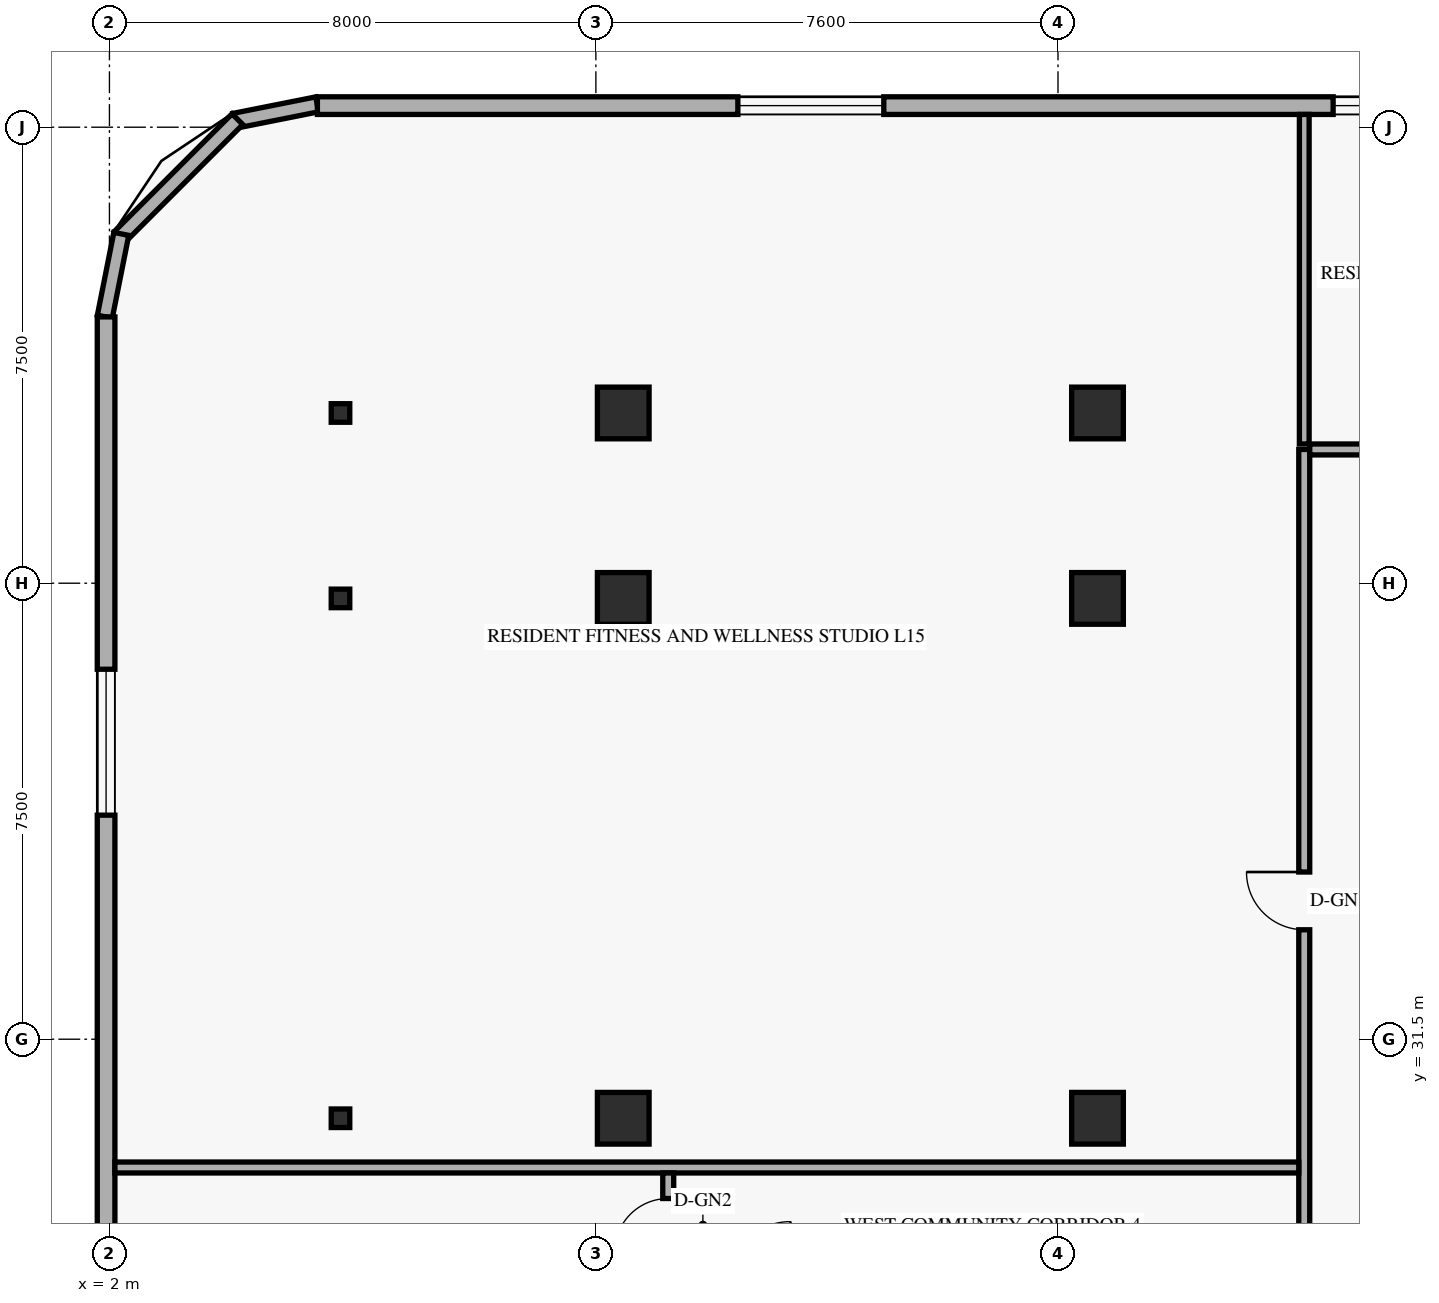
"""IFC4 building model, lengths in metres.
Left out: names, types, materials, properties, quantities, classifications, styles, units other than length and angle.
Written with IfcOpenShell. Run it as: python <this file> out.ifc"""

import sys

from ifc_helpers import new_model, si_unit, direction, frame, frame_2d, origin, origin_2d, place, context, subcontext, project, spatial, rectangle, hollow_rectangle, extrude, element, fill, save


model = new_model("IFC4")
c1 = context("Model", 3, precision=1e-05, world=origin(), true_north=direction((0.0, 1.0)))
c2 = subcontext(c1, "Body", "Model", "MODEL_VIEW")
j1 = project(units=[si_unit("LENGTHUNIT", "METRE"), si_unit("PLANEANGLEUNIT", "RADIAN")], contexts=[c1])
p1 = place(None, origin())
s1 = spatial("IfcSite", under=j1, at=p1, CompositionType="ELEMENT")
p2 = place(p1, origin())
s2 = spatial("IfcBuilding", under=s1, at=p2, CompositionType="ELEMENT")
p3 = place(p2, frame((0.0, 0.0, 60.0)))
s3 = spatial("IfcBuildingStorey", under=s2, at=p3, CompositionType="ELEMENT", Elevation=60.0)
for number, where, z_axis, x_axis in (
    (1, (5.8, 30.2, 0.0), (0.0, 0.0, 1.0), (1.0, 0.0, 0.0)),
    (2, (5.8, 38.75, 0.0), (0.0, 0.0, 1.0), (1.0, 0.0, 0.0)),
    (3, (5.8, 41.8, 0.0), (0.0, 0.0, 1.0), (1.0, 0.0, 0.0)),
):
    element("IfcColumn", number, at=place(p3, frame(where, z_axis=z_axis, x_axis=x_axis)), inside=s3, PredefinedType="COLUMN", context=c2, shape_type="SweptSolid", body=[
        extrude(hollow_rectangle(XDim=0.305, YDim=0.305, WallThickness=0.013, at=origin_2d()), origin(), (0.0, 0.0, 1.0), 4.2),
    ])
for number, where, z_axis, x_axis in (
    (4, (10.45, 30.2, 0.0), (0.0, 0.0, 1.0), (1.0, 0.0, 0.0)),
    (5, (10.45, 38.75, 0.0), (0.0, 0.0, 1.0), (1.0, 0.0, 0.0)),
    (6, (10.45, 41.8, 0.0), (0.0, 0.0, 1.0), (1.0, 0.0, 0.0)),
    (7, (18.25, 30.2, 0.0), (0.0, 0.0, 1.0), (1.0, 0.0, 0.0)),
    (8, (18.25, 38.75, 0.0), (0.0, 0.0, 1.0), (1.0, 0.0, 0.0)),
    (9, (18.25, 41.8, 0.0), (0.0, 0.0, 1.0), (1.0, 0.0, 0.0)),
):
    element("IfcColumn", number, at=place(p3, frame(where, z_axis=z_axis, x_axis=x_axis)), inside=s3, PredefinedType="COLUMN", context=c2, shape_type="SweptSolid", body=[
        extrude(rectangle(XDim=0.85, YDim=0.85, at=origin_2d()), origin(), (0.0, 0.0, 1.0), 4.2),
    ])
p4 = place(p3, frame((5.417, 46.876, 0.0), z_axis=(0.0, 0.0, 1.0), x_axis=(-0.980809899341, -0.19496651342, 0.0)))
e10 = element("IfcWall", 10, at=p4, inside=s3, PredefinedType="SOLIDWALL", context=c2, shape_type="SweptSolid", body=[
    extrude(rectangle(XDim=1.389, YDim=0.25, at=frame_2d((0.694, 0.0))), origin(), (0.0, 0.0, 1.0), 3.96),
])
p5 = place(p3, frame((4.105, 46.632, 0.0), z_axis=(0.0, 0.0, 1.0), x_axis=(-0.707106781187, -0.707106781187, 0.0)))
e11 = element("IfcWall", 11, at=p5, inside=s3, PredefinedType="SOLIDWALL", context=c2, shape_type="SweptSolid", body=[
    extrude(rectangle(XDim=2.739, YDim=0.25, at=frame_2d((1.37, 0.0))), origin(), (0.0, 0.0, 1.0), 3.96),
])
p6 = place(p3, frame((2.195, 44.746, 0.0), z_axis=(0.0, 0.0, 1.0), x_axis=(-0.19496651342, -0.980809899341, 0.0)))
e12 = element("IfcWall", 12, at=p6, inside=s3, PredefinedType="SOLIDWALL", context=c2, shape_type="SweptSolid", body=[
    extrude(rectangle(XDim=1.389, YDim=0.25, at=frame_2d((0.694, 0.0))), origin(), (0.0, 0.0, 1.0), 3.96),
])
p7 = place(p3, frame((25.0, 46.855, 0.0), z_axis=(0.0, 0.0, 1.0), x_axis=(-1.0, 0.0, 0.0)))
e13 = element("IfcWall", 13, at=p7, inside=s3, PredefinedType="SOLIDWALL", context=c2, shape_type="SweptSolid", body=[
    extrude(rectangle(XDim=19.58, YDim=0.29, at=frame_2d((9.79, 0.0))), origin(), (0.0, 0.0, 1.0), 3.96),
])
p8 = place(p7, frame((10.265, 0.0, 0.85)))
e14 = element("IfcOpeningElement", 14, at=p8, cuts=e13, PredefinedType="OPENING", context=c2, shape_type="SweptSolid", body=[
    extrude(rectangle(XDim=2.4, YDim=1.9, at=frame_2d((1.2, 0.95))), frame((0.0, 0.155, 0.0), z_axis=(0.0, -1.0, 0.0), x_axis=(1.0, 0.0, 0.0)), (0.0, 0.0, 1.0), 0.31),
])
p9 = place(p7, frame((0.475, 0.0, 0.85)))
e15 = element("IfcOpeningElement", 15, at=p9, cuts=e13, PredefinedType="OPENING", context=c2, shape_type="SweptSolid", body=[
    extrude(rectangle(XDim=2.4, YDim=1.9, at=frame_2d((1.2, 0.95))), frame((0.0, 0.155, 0.0), z_axis=(0.0, -1.0, 0.0), x_axis=(1.0, 0.0, 0.0)), (0.0, 0.0, 1.0), 0.31),
])
p10 = place(p3, frame((1.945, 43.38, 0.0), z_axis=(0.0, 0.0, 1.0), x_axis=(0.0, -1.0, 0.0)))
e16 = element("IfcWall", 16, at=p10, inside=s3, PredefinedType="SOLIDWALL", context=c2, shape_type="SweptSolid", body=[
    extrude(rectangle(XDim=38.76, YDim=0.29, at=frame_2d((19.38, 0.0))), origin(), (0.0, 0.0, 1.0), 3.96),
])
p11 = place(p10, frame((30.025, 0.0, 0.85)))
e17 = element("IfcOpeningElement", 17, at=p11, cuts=e16, PredefinedType="OPENING", context=c2, shape_type="SweptSolid", body=[
    extrude(rectangle(XDim=2.4, YDim=1.9, at=frame_2d((1.2, 0.95))), frame((0.0, 0.155, 0.0), z_axis=(0.0, -1.0, 0.0), x_axis=(1.0, 0.0, 0.0)), (0.0, 0.0, 1.0), 0.31),
])
p12 = place(p10, frame((17.64, 0.0, 0.85)))
e18 = element("IfcOpeningElement", 18, at=p12, cuts=e16, PredefinedType="OPENING", context=c2, shape_type="SweptSolid", body=[
    extrude(rectangle(XDim=2.4, YDim=1.9, at=frame_2d((1.2, 0.95))), frame((0.0, 0.155, 0.0), z_axis=(0.0, -1.0, 0.0), x_axis=(1.0, 0.0, 0.0)), (0.0, 0.0, 1.0), 0.31),
])
p13 = place(p10, frame((5.795, 0.0, 0.85)))
e19 = element("IfcOpeningElement", 19, at=p13, cuts=e16, PredefinedType="OPENING", context=c2, shape_type="SweptSolid", body=[
    extrude(rectangle(XDim=2.4, YDim=1.9, at=frame_2d((1.2, 0.95))), frame((0.0, 0.155, 0.0), z_axis=(0.0, -1.0, 0.0), x_axis=(1.0, 0.0, 0.0)), (0.0, 0.0, 1.0), 0.31),
])
p14 = place(p3, frame((21.65, 6.8, 0.0), z_axis=(0.0, 0.0, 1.0), x_axis=(0.0, 1.0, 0.0)))
e20 = element("IfcWall", 20, at=p14, inside=s3, PredefinedType="STANDARD", context=c2, shape_type="SweptSolid", body=[
    extrude(rectangle(XDim=34.4, YDim=0.18, at=frame_2d((17.2, 0.0))), origin(), (0.0, 0.0, 1.0), 3.249),
])
p15 = place(p14, frame((15.2, 0.0, 0.0)))
e21 = element("IfcOpeningElement", 21, at=p15, cuts=e20, PredefinedType="OPENING", context=c2, shape_type="SweptSolid", body=[
    extrude(rectangle(XDim=0.95, YDim=2.15, at=frame_2d((0.475, 1.075))), frame((0.0, 0.1, 0.0), z_axis=(0.0, -1.0, 0.0), x_axis=(1.0, 0.0, 0.0)), (0.0, 0.0, 1.0), 0.2),
])
p16 = place(p14, frame((6.2, 0.0, 0.0)))
e22 = element("IfcOpeningElement", 22, at=p16, cuts=e20, PredefinedType="OPENING", context=c2, shape_type="SweptSolid", body=[
    extrude(rectangle(XDim=0.95, YDim=2.15, at=frame_2d((0.475, 1.075))), frame((0.0, 0.1, 0.0), z_axis=(0.0, -1.0, 0.0), x_axis=(1.0, 0.0, 0.0)), (0.0, 0.0, 1.0), 0.2),
])
p17 = place(p14, frame((26.5, 0.0, 0.0)))
e23 = element("IfcOpeningElement", 23, at=p17, cuts=e20, PredefinedType="OPENING", context=c2, shape_type="SweptSolid", body=[
    extrude(rectangle(XDim=0.95, YDim=2.15, at=frame_2d((0.475, 1.075))), frame((0.0, 0.1, 0.0), z_axis=(0.0, -1.0, 0.0), x_axis=(1.0, 0.0, 0.0)), (0.0, 0.0, 1.0), 0.2),
])
p18 = place(p3, frame((21.74, 41.2, 0.0), z_axis=(0.0, 0.0, 1.0), x_axis=(1.0, 0.0, 0.0)))
e24 = element("IfcWall", 24, at=p18, inside=s3, PredefinedType="STANDARD", context=c2, shape_type="SweptSolid", body=[
    extrude(rectangle(XDim=15.57, YDim=0.18, at=frame_2d((7.785, 0.0))), origin(), (0.0, 0.0, 1.0), 3.249),
])
p19 = place(p18, frame((5.41, 0.0, 0.0)))
e25 = element("IfcOpeningElement", 25, at=p19, cuts=e24, PredefinedType="OPENING", context=c2, shape_type="SweptSolid", body=[
    extrude(rectangle(XDim=0.95, YDim=2.15, at=frame_2d((0.475, 1.075))), frame((0.0, 0.1, 0.0), z_axis=(0.0, -1.0, 0.0), x_axis=(1.0, 0.0, 0.0)), (0.0, 0.0, 1.0), 0.2),
])
p20 = place(p3, frame((21.65, 41.29, 0.0), z_axis=(0.0, 0.0, 1.0), x_axis=(0.0, 1.0, 0.0)))
e26 = element("IfcWall", 26, at=p20, inside=s3, PredefinedType="PARTITIONING", context=c2, shape_type="SweptSolid", body=[
    extrude(rectangle(XDim=5.42, YDim=0.16, at=frame_2d((2.71, 0.0))), origin(), (0.0, 0.0, 1.0), 3.409),
])
p21 = place(p3, frame((2.09, 29.39, 0.0), z_axis=(0.0, 0.0, 1.0), x_axis=(1.0, 0.0, 0.0)))
e27 = element("IfcWall", 27, at=p21, inside=s3, PredefinedType="STANDARD", context=c2, shape_type="SweptSolid", body=[
    extrude(rectangle(XDim=19.47, YDim=0.18, at=frame_2d((9.735, 0.0))), origin(), (0.0, 0.0, 1.0), 3.249),
])
p22 = place(p3, frame((11.19, 27.45, 0.0), z_axis=(0.0, 0.0, 1.0), x_axis=(0.0, 1.0, 0.0)))
e28 = element("IfcWall", 28, at=p22, inside=s3, PredefinedType="STANDARD", context=c2, shape_type="SweptSolid", body=[
    extrude(rectangle(XDim=1.85, YDim=0.18, at=frame_2d((0.925, 0.0))), origin(), (0.0, 0.0, 1.0), 3.96),
])
p23 = place(p22, frame((0.55, 0.0, 0.0)))
e29 = element("IfcOpeningElement", 29, at=p23, cuts=e28, PredefinedType="OPENING", context=c2, shape_type="SweptSolid", body=[
    extrude(rectangle(XDim=0.88, YDim=2.12, at=frame_2d((0.44, 1.06))), frame((0.0, 0.1, 0.0), z_axis=(0.0, -1.0, 0.0), x_axis=(1.0, 0.0, 0.0)), (0.0, 0.0, 1.0), 0.2),
])
p24 = place(p8, origin())
e30 = element("IfcWindow", 30, at=p24, inside=s3, PartitioningType="SINGLE_PANEL", PredefinedType="WINDOW", context=c2, shape_type="SweptSolid", body=[
    extrude(rectangle(XDim=2.4, YDim=1.9, at=frame_2d((1.2, 0.95))), frame((0.0, 0.03, 0.0), z_axis=(0.0, -1.0, 0.0), x_axis=(1.0, 0.0, 0.0)), (0.0, 0.0, 1.0), 0.06),
])
fill(e14, e30)
p25 = place(p9, origin())
e31 = element("IfcWindow", 31, at=p25, inside=s3, PartitioningType="SINGLE_PANEL", PredefinedType="WINDOW", context=c2, shape_type="SweptSolid", body=[
    extrude(rectangle(XDim=2.4, YDim=1.9, at=frame_2d((1.2, 0.95))), frame((0.0, 0.03, 0.0), z_axis=(0.0, -1.0, 0.0), x_axis=(1.0, 0.0, 0.0)), (0.0, 0.0, 1.0), 0.06),
])
fill(e15, e31)
p26 = place(p13, origin())
e32 = element("IfcWindow", 32, at=p26, inside=s3, PartitioningType="SINGLE_PANEL", PredefinedType="WINDOW", context=c2, shape_type="SweptSolid", body=[
    extrude(rectangle(XDim=2.4, YDim=1.9, at=frame_2d((1.2, 0.95))), frame((0.0, 0.03, 0.0), z_axis=(0.0, -1.0, 0.0), x_axis=(1.0, 0.0, 0.0)), (0.0, 0.0, 1.0), 0.06),
])
fill(e19, e32)
p27 = place(p23, origin())
e33 = element("IfcDoor", 33, at=p27, inside=s3, OperationType="SINGLE_SWING_LEFT", PredefinedType="DOOR", context=c2, shape_type="SweptSolid", body=[
    extrude(rectangle(XDim=0.88, YDim=2.12, at=frame_2d((0.44, 1.06))), frame((0.0, 0.025, 0.0), z_axis=(0.0, -1.0, 0.0), x_axis=(1.0, 0.0, 0.0)), (0.0, 0.0, 1.0), 0.05),
])
fill(e29, e33)
p28 = place(p17, origin())
e34 = element("IfcDoor", 34, at=p28, inside=s3, OperationType="SINGLE_SWING_RIGHT", PredefinedType="DOOR", context=c2, shape_type="SweptSolid", body=[
    extrude(rectangle(XDim=0.95, YDim=2.15, at=frame_2d((0.475, 1.075))), frame((0.0, 0.025, 0.0), z_axis=(0.0, -1.0, 0.0), x_axis=(1.0, 0.0, 0.0)), (0.0, 0.0, 1.0), 0.05),
])
fill(e23, e34)
save(model, sys.argv[1])
